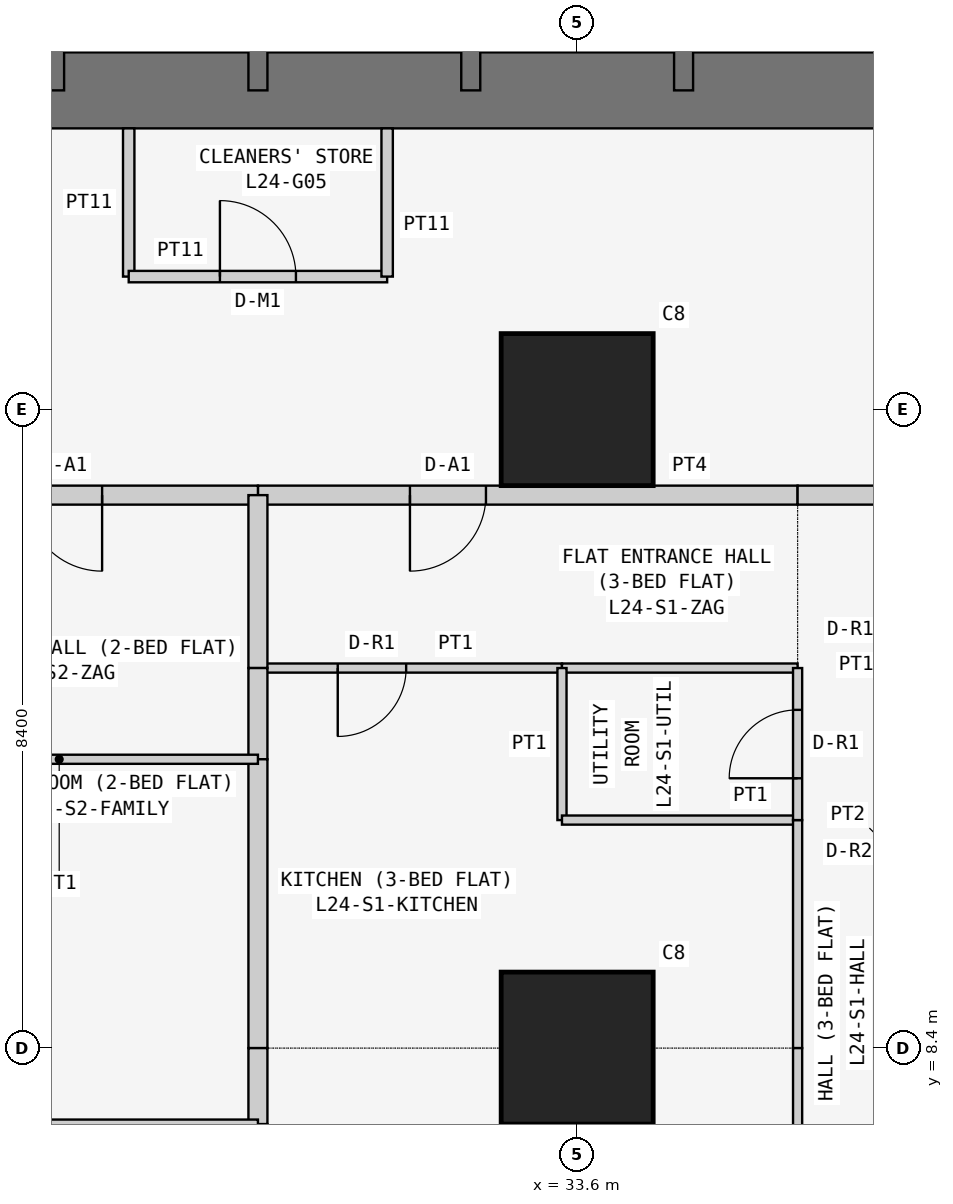
"""IFC4 building model, lengths in metres.
Left out: names, types, materials, properties, quantities, classifications, styles, units other than length and angle.
Written with IfcOpenShell. Run it as: python <this file> out.ifc"""

import sys

from ifc_helpers import new_model, si_unit, direction, frame, frame_2d, origin, origin_2d, place, context, subcontext, project, spatial, rectangle, extrude, element, fill, save


model = new_model("IFC4")
c1 = context("Model", 3, precision=1e-05, world=origin(), true_north=direction((0.0, 1.0)))
c2 = subcontext(c1, "Body", "Model", "MODEL_VIEW")
j1 = project(units=[si_unit("LENGTHUNIT", "METRE"), si_unit("PLANEANGLEUNIT", "RADIAN")], contexts=[c1])
p1 = place(None, origin())
s1 = spatial("IfcSite", under=j1, at=p1, CompositionType="ELEMENT")
p2 = place(p1, origin())
s2 = spatial("IfcBuilding", under=s1, at=p2, CompositionType="ELEMENT")
p3 = place(p2, frame((0.0, 0.0, 95.7)))
s3 = spatial("IfcBuildingStorey", under=s2, at=p3, CompositionType="ELEMENT", Elevation=95.7)
for number, where, z_axis, x_axis in (
    (1, (33.6, 8.4, 0.0), (0.0, 0.0, 1.0), (1.0, 0.0, 0.0)),
    (2, (33.6, 16.8, 0.0), (0.0, 0.0, 1.0), (1.0, 0.0, 0.0)),
):
    element("IfcColumn", number, at=place(p3, frame(where, z_axis=z_axis, x_axis=x_axis)), inside=s3, PredefinedType="COLUMN", context=c2, shape_type="SweptSolid", body=[
        extrude(rectangle(XDim=2.0, YDim=2.0, at=origin_2d()), origin(), (0.0, 0.0, 1.0), 3.6),
    ])
p4 = place(p3, frame((21.0, 21.0, 0.0), z_axis=(0.0, 0.0, 1.0), x_axis=(1.0, 0.0, 0.0)))
e3 = element("IfcWall", 3, at=p4, inside=s3, PredefinedType="SHEAR", context=c2, shape_type="SweptSolid", body=[
    extrude(rectangle(XDim=17.3, YDim=1.0, at=frame_2d((8.65, 0.0))), origin(), (0.0, 0.0, 1.0), 3.6),
])
p5 = place(p3, frame((37.8, 21.0, 0.0), z_axis=(0.0, 0.0, 1.0), x_axis=(0.0, 1.0, 0.0)))
e4 = element("IfcWall", 4, at=p5, inside=s3, PredefinedType="SHEAR", context=c2, shape_type="SweptSolid", body=[
    extrude(rectangle(XDim=17.3, YDim=1.0, at=frame_2d((8.65, 0.0))), origin(), (0.0, 0.0, 1.0), 3.6),
])
p6 = place(p5, frame((5.2, 0.0, 0.0)))
e5 = element("IfcOpeningElement", 5, at=p6, cuts=e4, PredefinedType="OPENING", context=c2, shape_type="SweptSolid", body=[
    extrude(rectangle(XDim=1.2, YDim=2.1, at=frame_2d((0.6, 1.05))), frame((0.0, 0.51, 0.0), z_axis=(0.0, -1.0, 0.0), x_axis=(1.0, 0.0, 0.0)), (0.0, 0.0, 1.0), 1.02),
])
p7 = place(p3, frame((26.6, 21.0, 0.0), z_axis=(0.0, 0.0, 1.0), x_axis=(0.0, 1.0, 0.0)))
e6 = element("IfcWall", 6, at=p7, inside=s3, PredefinedType="SHEAR", context=c2, shape_type="SweptSolid", body=[
    extrude(rectangle(XDim=16.8, YDim=0.5, at=frame_2d((8.4, 0.0))), origin(), (0.0, 0.0, 1.0), 3.6),
])
p8 = place(p7, frame((10.4, 0.0, 0.0)))
e7 = element("IfcOpeningElement", 7, at=p8, cuts=e6, PredefinedType="OPENING", context=c2, shape_type="SweptSolid", body=[
    extrude(rectangle(XDim=1.2, YDim=2.1, at=frame_2d((0.6, 1.05))), frame((0.0, 0.26, 0.0), z_axis=(0.0, -1.0, 0.0), x_axis=(1.0, 0.0, 0.0)), (0.0, 0.0, 1.0), 0.52),
])
for number, where, z_axis, x_axis in (
    (8, (29.4, 21.0, 0.0), (0.0, 0.0, 1.0), (0.0, 1.0, 0.0)),
    (9, (32.2, 21.0, 0.0), (0.0, 0.0, 1.0), (0.0, 1.0, 0.0)),
    (10, (35.0, 21.0, 0.0), (0.0, 0.0, 1.0), (0.0, 1.0, 0.0)),
):
    element("IfcWall", number, at=place(p3, frame(where, z_axis=z_axis, x_axis=x_axis)), inside=s3, PredefinedType="SHEAR", context=c2, shape_type="SweptSolid", body=[
        extrude(rectangle(XDim=3.2, YDim=0.25, at=frame_2d((1.6, 0.0))), origin(), (0.0, 0.0, 1.0), 3.6),
    ])
p9 = place(p3, frame((27.7, 20.5, 0.0), z_axis=(0.0, 0.0, 1.0), x_axis=(0.0, -1.0, 0.0)))
e11 = element("IfcWall", 11, at=p9, inside=s3, PredefinedType="PARTITIONING", context=c2, shape_type="SweptSolid", body=[
    extrude(rectangle(XDim=1.95, YDim=0.15, at=frame_2d((0.975, 0.0))), origin(), (0.0, 0.0, 1.0), 3.45),
])
p10 = place(p3, frame((27.7, 18.55, 0.0), z_axis=(0.0, 0.0, 1.0), x_axis=(1.0, 0.0, 0.0)))
e12 = element("IfcWall", 12, at=p10, inside=s3, PredefinedType="PARTITIONING", context=c2, shape_type="SweptSolid", body=[
    extrude(rectangle(XDim=3.4, YDim=0.15, at=frame_2d((1.7, 0.0))), origin(), (0.0, 0.0, 1.0), 3.45),
])
p11 = place(p10, frame((1.2, 0.0, 0.0)))
e13 = element("IfcOpeningElement", 13, at=p11, cuts=e12, PredefinedType="OPENING", context=c2, shape_type="SweptSolid", body=[
    extrude(rectangle(XDim=1.0, YDim=2.1, at=frame_2d((0.5, 1.05))), frame((0.0, 0.085, 0.0), z_axis=(0.0, -1.0, 0.0), x_axis=(1.0, 0.0, 0.0)), (0.0, 0.0, 1.0), 0.17),
])
p12 = place(p3, frame((31.1, 18.55, 0.0), z_axis=(0.0, 0.0, 1.0), x_axis=(0.0, 1.0, 0.0)))
e14 = element("IfcWall", 14, at=p12, inside=s3, PredefinedType="PARTITIONING", context=c2, shape_type="SweptSolid", body=[
    extrude(rectangle(XDim=1.95, YDim=0.15, at=frame_2d((0.975, 0.0))), origin(), (0.0, 0.0, 1.0), 3.45),
])
p13 = place(p3, frame((36.5, 15.675, 0.0), z_axis=(0.0, 0.0, 1.0), x_axis=(-1.0, 0.0, 0.0)))
e15 = element("IfcWall", 15, at=p13, inside=s3, PredefinedType="PARTITIONING", context=c2, shape_type="SweptSolid", body=[
    extrude(rectangle(XDim=7.1, YDim=0.25, at=frame_2d((3.55, 0.0))), origin(), (0.0, 0.0, 1.0), 3.45),
])
p14 = place(p13, frame((4.1, 0.0, 0.0)))
e16 = element("IfcOpeningElement", 16, at=p14, cuts=e15, PredefinedType="OPENING", context=c2, shape_type="SweptSolid", body=[
    extrude(rectangle(XDim=1.0, YDim=2.1, at=frame_2d((0.5, 1.05))), frame((0.0, 0.135, 0.0), z_axis=(0.0, -1.0, 0.0), x_axis=(1.0, 0.0, 0.0)), (0.0, 0.0, 1.0), 0.27),
])
p15 = place(p3, frame((37.7, 15.675, 0.0), z_axis=(0.0, 0.0, 1.0), x_axis=(-1.0, 0.0, 0.0)))
e17 = element("IfcWall", 17, at=p15, inside=s3, PredefinedType="PARTITIONING", context=c2, shape_type="SweptSolid", body=[
    extrude(rectangle(XDim=1.2, YDim=0.25, at=frame_2d((0.6, 0.0))), origin(), (0.0, 0.0, 1.0), 3.45),
])
p16 = place(p3, frame((29.4, 15.675, 0.0), z_axis=(0.0, 0.0, 1.0), x_axis=(-1.0, 0.0, 0.0)))
e18 = element("IfcWall", 18, at=p16, inside=s3, PredefinedType="PARTITIONING", context=c2, shape_type="SweptSolid", body=[
    extrude(rectangle(XDim=5.229, YDim=0.25, at=frame_2d((2.615, 0.0))), origin(), (0.0, 0.0, 1.0), 3.45),
])
p17 = place(p16, frame((2.05, 0.0, 0.0)))
e19 = element("IfcOpeningElement", 19, at=p17, cuts=e18, PredefinedType="OPENING", context=c2, shape_type="SweptSolid", body=[
    extrude(rectangle(XDim=1.0, YDim=2.1, at=frame_2d((0.5, 1.05))), frame((0.0, 0.135, 0.0), z_axis=(0.0, -1.0, 0.0), x_axis=(1.0, 0.0, 0.0)), (0.0, 0.0, 1.0), 0.27),
])
p18 = place(p3, frame((29.4, 13.4, 0.0), z_axis=(0.0, 0.0, 1.0), x_axis=(1.0, 0.0, 0.0)))
e20 = element("IfcWall", 20, at=p18, inside=s3, PredefinedType="PARTITIONING", context=c2, shape_type="SweptSolid", body=[
    extrude(rectangle(XDim=4.0, YDim=0.12, at=frame_2d((2.0, 0.0))), origin(), (0.0, 0.0, 1.0), 3.45),
])
p19 = place(p18, frame((1.05, 0.0, 0.0)))
e21 = element("IfcOpeningElement", 21, at=p19, cuts=e20, PredefinedType="OPENING", context=c2, shape_type="SweptSolid", body=[
    extrude(rectangle(XDim=0.9, YDim=2.1, at=frame_2d((0.45, 1.05))), frame((0.0, 0.07, 0.0), z_axis=(0.0, -1.0, 0.0), x_axis=(1.0, 0.0, 0.0)), (0.0, 0.0, 1.0), 0.14),
])
p20 = place(p3, frame((33.4, 13.4, 0.0), z_axis=(0.0, 0.0, 1.0), x_axis=(1.0, 0.0, 0.0)))
e22 = element("IfcWall", 22, at=p20, inside=s3, PredefinedType="PARTITIONING", context=c2, shape_type="SweptSolid", body=[
    extrude(rectangle(XDim=3.1, YDim=0.12, at=frame_2d((1.55, 0.0))), origin(), (0.0, 0.0, 1.0), 3.45),
])
p21 = place(p3, frame((29.4, 15.675, 0.0), z_axis=(0.0, 0.0, 1.0), x_axis=(0.0, -1.0, 0.0)))
e23 = element("IfcWall", 23, at=p21, inside=s3, PredefinedType="PARTITIONING", context=c2, shape_type="SweptSolid", body=[
    extrude(rectangle(XDim=2.275, YDim=0.25, at=frame_2d((1.138, 0.0))), origin(), (0.0, 0.0, 1.0), 2.848),
])
p22 = place(p3, frame((33.4, 13.4, 0.0), z_axis=(0.0, 0.0, 1.0), x_axis=(0.0, -1.0, 0.0)))
e24 = element("IfcWall", 24, at=p22, inside=s3, PredefinedType="PARTITIONING", context=c2, shape_type="SweptSolid", body=[
    extrude(rectangle(XDim=2.0, YDim=0.12, at=frame_2d((1.0, 0.0))), origin(), (0.0, 0.0, 1.0), 3.45),
])
p23 = place(p3, frame((33.4, 11.4, 0.0), z_axis=(0.0, 0.0, 1.0), x_axis=(1.0, 0.0, 0.0)))
e25 = element("IfcWall", 25, at=p23, inside=s3, PredefinedType="PARTITIONING", context=c2, shape_type="SweptSolid", body=[
    extrude(rectangle(XDim=3.1, YDim=0.12, at=frame_2d((1.55, 0.0))), origin(), (0.0, 0.0, 1.0), 3.45),
])
p24 = place(p3, frame((36.5, 11.4, 0.0), z_axis=(0.0, 0.0, 1.0), x_axis=(0.0, -1.0, 0.0)))
e26 = element("IfcWall", 26, at=p24, inside=s3, PredefinedType="PARTITIONING", context=c2, shape_type="SweptSolid", body=[
    extrude(rectangle(XDim=3.0, YDim=0.12, at=frame_2d((1.5, 0.0))), origin(), (0.0, 0.0, 1.0), 3.45),
])
p25 = place(p3, frame((29.4, 12.2, 0.0), z_axis=(0.0, 0.0, 1.0), x_axis=(0.0, 1.0, 0.0)))
e27 = element("IfcWall", 27, at=p25, inside=s3, PredefinedType="PARTITIONING", context=c2, shape_type="SweptSolid", body=[
    extrude(rectangle(XDim=1.2, YDim=0.25, at=frame_2d((0.6, 0.0))), origin(), (0.0, 0.0, 1.0), 2.848),
])
p26 = place(p3, frame((29.4, 8.4, 0.0), z_axis=(0.0, 0.0, 1.0), x_axis=(0.0, 1.0, 0.0)))
e28 = element("IfcWall", 28, at=p26, inside=s3, PredefinedType="PARTITIONING", context=c2, shape_type="SweptSolid", body=[
    extrude(rectangle(XDim=3.8, YDim=0.25, at=frame_2d((1.9, 0.0))), origin(), (0.0, 0.0, 1.0), 2.848),
])
p27 = place(p3, frame((36.5, 11.4, 0.0), z_axis=(0.0, 0.0, 1.0), x_axis=(0.0, 1.0, 0.0)))
e29 = element("IfcWall", 29, at=p27, inside=s3, PredefinedType="PARTITIONING", context=c2, shape_type="SweptSolid", body=[
    extrude(rectangle(XDim=2.0, YDim=0.12, at=frame_2d((1.0, 0.0))), origin(), (0.0, 0.0, 1.0), 3.45),
])
p28 = place(p27, frame((0.55, 0.0, 0.0)))
e30 = element("IfcOpeningElement", 30, at=p28, cuts=e29, PredefinedType="OPENING", context=c2, shape_type="SweptSolid", body=[
    extrude(rectangle(XDim=0.9, YDim=2.1, at=frame_2d((0.45, 1.05))), frame((0.0, 0.07, 0.0), z_axis=(0.0, -1.0, 0.0), x_axis=(1.0, 0.0, 0.0)), (0.0, 0.0, 1.0), 0.14),
])
p29 = place(p3, frame((36.5, 8.4, 0.0), z_axis=(0.0, 0.0, 1.0), x_axis=(0.0, -1.0, 0.0)))
e31 = element("IfcWall", 31, at=p29, inside=s3, PredefinedType="PARTITIONING", context=c2, shape_type="SweptSolid", body=[
    extrude(rectangle(XDim=4.9, YDim=0.12, at=frame_2d((2.45, 0.0))), origin(), (0.0, 0.0, 1.0), 3.45),
])
p30 = place(p29, frame((2.15, 0.0, 0.0)))
e32 = element("IfcOpeningElement", 32, at=p30, cuts=e31, PredefinedType="OPENING", context=c2, shape_type="SweptSolid", body=[
    extrude(rectangle(XDim=0.9, YDim=2.1, at=frame_2d((0.45, 1.05))), frame((0.0, 0.07, 0.0), z_axis=(0.0, -1.0, 0.0), x_axis=(1.0, 0.0, 0.0)), (0.0, 0.0, 1.0), 0.14),
])
p31 = place(p3, frame((29.4, 7.4, 0.0), z_axis=(0.0, 0.0, 1.0), x_axis=(0.0, 1.0, 0.0)))
e33 = element("IfcWall", 33, at=p31, inside=s3, PredefinedType="PARTITIONING", context=c2, shape_type="SweptSolid", body=[
    extrude(rectangle(XDim=1.0, YDim=0.25, at=frame_2d((0.5, 0.0))), origin(), (0.0, 0.0, 1.0), 2.848),
])
p32 = place(p3, frame((29.4, 4.7, 0.0), z_axis=(0.0, 0.0, 1.0), x_axis=(0.0, 1.0, 0.0)))
e34 = element("IfcWall", 34, at=p32, inside=s3, PredefinedType="PARTITIONING", context=c2, shape_type="SweptSolid", body=[
    extrude(rectangle(XDim=2.7, YDim=0.25, at=frame_2d((1.35, 0.0))), origin(), (0.0, 0.0, 1.0), 2.848),
])
for number, where, z_axis, x_axis in (
    (35, (29.4, 12.2, 0.0), (0.0, 0.0, 1.0), (-1.0, 0.0, 0.0)),
    (36, (29.4, 7.4, 0.0), (0.0, 0.0, 1.0), (-1.0, 0.0, 0.0)),
):
    element("IfcWall", number, at=place(p3, frame(where, z_axis=z_axis, x_axis=x_axis)), inside=s3, PredefinedType="PARTITIONING", context=c2, shape_type="SweptSolid", body=[
        extrude(rectangle(XDim=5.229, YDim=0.12, at=frame_2d((2.615, 0.0))), origin(), (0.0, 0.0, 1.0), 3.45),
    ])
p33 = place(p11, origin())
e37 = element("IfcDoor", 37, at=p33, inside=s3, OperationType="SINGLE_SWING_LEFT", PredefinedType="DOOR", context=c2, shape_type="SweptSolid", body=[
    extrude(rectangle(XDim=1.0, YDim=2.1, at=frame_2d((0.5, 1.05))), frame((0.0, 0.025, 0.0), z_axis=(0.0, -1.0, 0.0), x_axis=(1.0, 0.0, 0.0)), (0.0, 0.0, 1.0), 0.05),
])
fill(e13, e37)
p34 = place(p14, origin())
e38 = element("IfcDoor", 38, at=p34, inside=s3, OperationType="SINGLE_SWING_RIGHT", PredefinedType="DOOR", context=c2, shape_type="SweptSolid", body=[
    extrude(rectangle(XDim=1.0, YDim=2.1, at=frame_2d((0.5, 1.05))), frame((0.0, 0.025, 0.0), z_axis=(0.0, -1.0, 0.0), x_axis=(1.0, 0.0, 0.0)), (0.0, 0.0, 1.0), 0.05),
])
fill(e16, e38)
p35 = place(p19, frame((0.9, 0.0, 0.0), z_axis=(0.0, 0.0, 1.0), x_axis=(-1.0, 0.0, 0.0)))
e39 = element("IfcDoor", 39, at=p35, inside=s3, OperationType="SINGLE_SWING_RIGHT", PredefinedType="DOOR", context=c2, shape_type="SweptSolid", body=[
    extrude(rectangle(XDim=0.9, YDim=2.1, at=frame_2d((0.45, 1.05))), frame((0.0, 0.025, 0.0), z_axis=(0.0, -1.0, 0.0), x_axis=(1.0, 0.0, 0.0)), (0.0, 0.0, 1.0), 0.05),
])
fill(e21, e39)
p36 = place(p28, origin())
e40 = element("IfcDoor", 40, at=p36, inside=s3, OperationType="SINGLE_SWING_LEFT", PredefinedType="DOOR", context=c2, shape_type="SweptSolid", body=[
    extrude(rectangle(XDim=0.9, YDim=2.1, at=frame_2d((0.45, 1.05))), frame((0.0, 0.025, 0.0), z_axis=(0.0, -1.0, 0.0), x_axis=(1.0, 0.0, 0.0)), (0.0, 0.0, 1.0), 0.05),
])
fill(e30, e40)
p37 = place(p17, origin())
e41 = element("IfcDoor", 41, at=p37, inside=s3, OperationType="SINGLE_SWING_LEFT", PredefinedType="DOOR", context=c2, shape_type="SweptSolid", body=[
    extrude(rectangle(XDim=1.0, YDim=2.1, at=frame_2d((0.5, 1.05))), frame((0.0, 0.025, 0.0), z_axis=(0.0, -1.0, 0.0), x_axis=(1.0, 0.0, 0.0)), (0.0, 0.0, 1.0), 0.05),
])
fill(e19, e41)
save(model, sys.argv[1])
